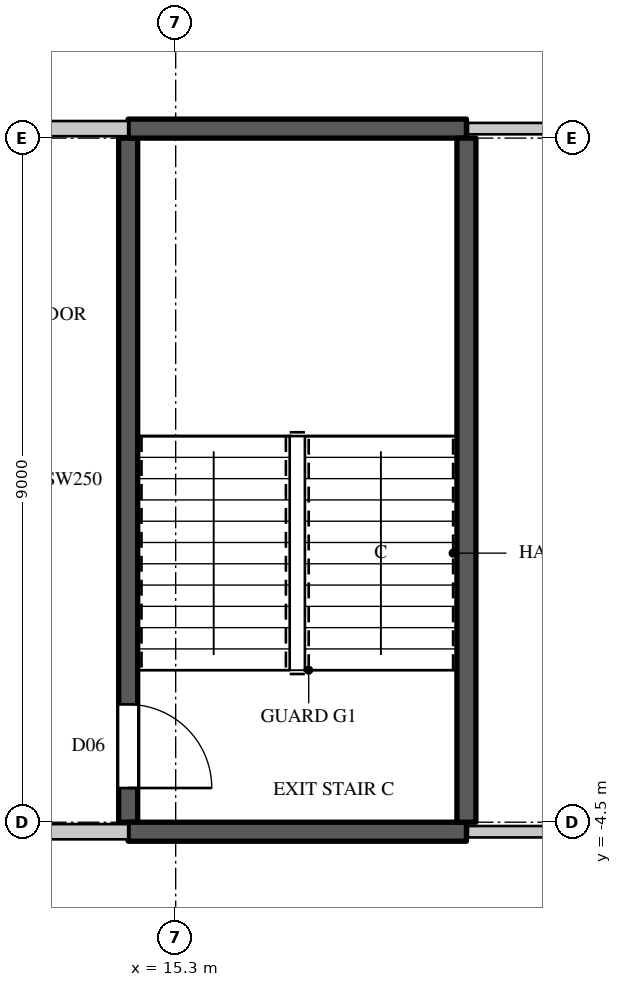
"""IFC4 building model, lengths in metres.
Left out: names, types, materials, properties, quantities, classifications, styles, units other than length and angle.
Written with IfcOpenShell. Run it as: python <this file> out.ifc"""

import sys

from ifc_helpers import new_model, si_unit, direction, frame, frame_2d, origin, place, context, subcontext, project, spatial, rectangle, extrude, element, fill, save


model = new_model("IFC4")
c1 = context("Model", 3, precision=1e-05, world=origin(), true_north=direction((0.0, 1.0)))
c2 = subcontext(c1, "Body", "Model", "MODEL_VIEW")
j1 = project(units=[si_unit("LENGTHUNIT", "METRE"), si_unit("PLANEANGLEUNIT", "RADIAN")], contexts=[c1])
p1 = place(None, origin())
s1 = spatial("IfcSite", under=j1, at=p1, CompositionType="ELEMENT")
p2 = place(p1, origin())
s2 = spatial("IfcBuilding", under=s1, at=p2, CompositionType="ELEMENT")
p3 = place(p2, frame((0.0, 0.0, 321.3)))
s3 = spatial("IfcBuildingStorey", under=s2, at=p3, CompositionType="ELEMENT", Elevation=321.3)
for number, where, z_axis, x_axis in (
    (1, (11.7, -4.625, 0.0), (0.0, 0.0, 1.0), (1.0, 0.0, 0.0)),
    (2, (11.7, 4.625, 0.0), (0.0, 0.0, 1.0), (1.0, 0.0, 0.0)),
):
    element("IfcWall", number, at=place(p3, frame(where, z_axis=z_axis, x_axis=x_axis)), inside=s3, PredefinedType="PARTITIONING", context=c2, shape_type="SweptSolid", body=[
        extrude(rectangle(XDim=2.975, YDim=0.2, at=frame_2d((1.488, 0.0))), origin(), (0.0, 0.0, 1.0), 3.8),
    ])
for number, where, z_axis, x_axis in (
    (3, (19.145, -4.625, 0.0), (0.0, 0.0, 1.0), (1.0, 0.0, 0.0)),
    (4, (19.145, 4.625, 0.0), (0.0, 0.0, 1.0), (1.0, 0.0, 0.0)),
):
    element("IfcWall", number, at=place(p3, frame(where, z_axis=z_axis, x_axis=x_axis)), inside=s3, PredefinedType="PARTITIONING", context=c2, shape_type="SweptSolid", body=[
        extrude(rectangle(XDim=4.705, YDim=0.15, at=frame_2d((2.353, 0.0))), origin(), (0.0, 0.0, 1.0), 3.8),
    ])
p4 = place(p3, frame((14.675, -4.5, 0.0), z_axis=(0.0, 0.0, 1.0), x_axis=(0.0, 1.0, 0.0)))
e5 = element("IfcWall", 5, at=p4, inside=s3, PredefinedType="SHEAR", context=c2, shape_type="SweptSolid", body=[
    extrude(rectangle(XDim=9.0, YDim=0.25, at=frame_2d((4.5, 0.0))), origin(), (0.0, 0.0, 1.0), 3.8),
])
p5 = place(p4, frame((0.45, 0.0, 0.0)))
e6 = element("IfcOpeningElement", 6, at=p5, cuts=e5, PredefinedType="OPENING", context=c2, shape_type="SweptSolid", body=[
    extrude(rectangle(XDim=1.1, YDim=2.2, at=frame_2d((0.55, 1.1))), frame((0.0, 0.135, 0.0), z_axis=(0.0, -1.0, 0.0), x_axis=(1.0, 0.0, 0.0)), (0.0, 0.0, 1.0), 0.27),
])
for number, where, z_axis, x_axis in (
    (7, (14.675, -4.625, 0.0), (0.0, 0.0, 1.0), (1.0, 0.0, 0.0)),
    (8, (14.675, 4.625, 0.0), (0.0, 0.0, 1.0), (1.0, 0.0, 0.0)),
):
    element("IfcWall", number, at=place(p3, frame(where, z_axis=z_axis, x_axis=x_axis)), inside=s3, PredefinedType="SHEAR", context=c2, shape_type="SweptSolid", body=[
        extrude(rectangle(XDim=4.45, YDim=0.25, at=frame_2d((2.225, 0.0))), origin(), (0.0, 0.0, 1.0), 3.8),
    ])
p6 = place(p3, frame((19.125, -4.5, 0.0), z_axis=(0.0, 0.0, 1.0), x_axis=(0.0, 1.0, 0.0)))
e9 = element("IfcWall", 9, at=p6, inside=s3, PredefinedType="SHEAR", context=c2, shape_type="SweptSolid", body=[
    extrude(rectangle(XDim=9.0, YDim=0.25, at=frame_2d((4.5, 0.0))), origin(), (0.0, 0.0, 1.0), 3.8),
])
p7 = place(p5, origin())
e10 = element("IfcDoor", 10, at=p7, inside=s3, OperationType="SINGLE_SWING_RIGHT", PredefinedType="DOOR", context=c2, shape_type="SweptSolid", body=[
    extrude(rectangle(XDim=1.1, YDim=2.2, at=frame_2d((0.55, 1.1))), frame((0.0, 0.025, 0.0), z_axis=(0.0, -1.0, 0.0), x_axis=(1.0, 0.0, 0.0)), (0.0, 0.0, 1.0), 0.05),
])
fill(e6, e10)
save(model, sys.argv[1])
